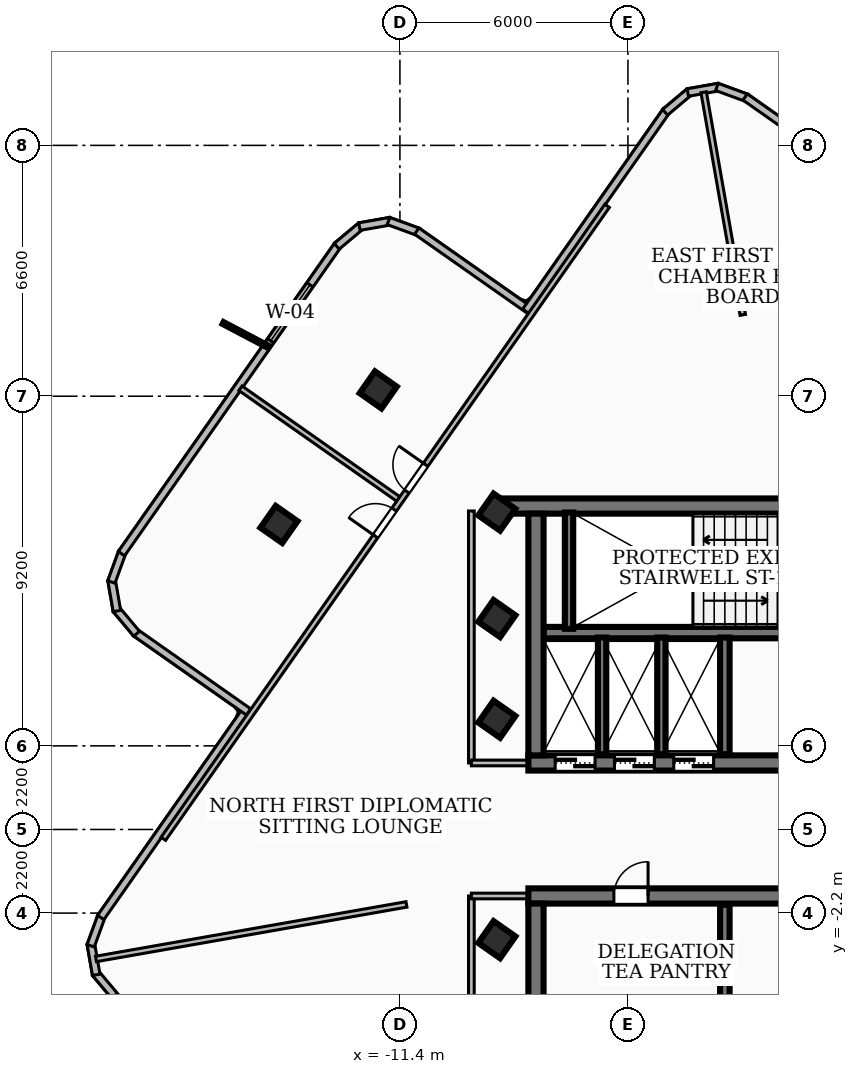
"""IFC4 building model, lengths in metres.
Left out: names, types, materials, properties, quantities, classifications, styles, units other than length and angle.
Written with IfcOpenShell. Run it as: python <this file> out.ifc"""

import sys

from ifc_helpers import new_model, si_unit, direction, frame, frame_2d, origin, origin_2d, place, context, subcontext, project, spatial, rectangle, extrude, element, fill, save


model = new_model("IFC4")
c1 = context("Model", 3, precision=1e-05, world=origin(), true_north=direction((0.0, 1.0)))
c2 = subcontext(c1, "Body", "Model", "MODEL_VIEW")
j1 = project(units=[si_unit("LENGTHUNIT", "METRE"), si_unit("PLANEANGLEUNIT", "RADIAN")], contexts=[c1])
p1 = place(None, origin())
s1 = spatial("IfcSite", under=j1, at=p1, CompositionType="ELEMENT")
p2 = place(p1, origin())
s2 = spatial("IfcBuilding", under=s1, at=p2, CompositionType="ELEMENT")
p3 = place(p2, frame((0.0, 0.0, 264.6)))
s3 = spatial("IfcBuildingStorey", under=s2, at=p3, CompositionType="ELEMENT", Elevation=264.6)
p4 = place(p3, frame((-8.78, 8.51, 0.0), z_axis=(0.0, 0.0, 1.0), x_axis=(1.0, 0.0, 0.0)))
e1 = element("IfcWall", 1, at=p4, inside=s3, PredefinedType="SHEAR", context=c2, shape_type="SweptSolid", body=[
    extrude(rectangle(XDim=17.56, YDim=0.4, at=frame_2d((8.78, 0.0))), origin(), (0.0, 0.0, 1.0), 3.16),
])
p5 = place(p3, frame((8.02, 1.75, 0.0), z_axis=(0.0, 0.0, 1.0), x_axis=(-1.0, 0.0, 0.0)))
e2 = element("IfcWall", 2, at=p5, inside=s3, PredefinedType="SHEAR", context=c2, shape_type="SweptSolid", body=[
    extrude(rectangle(XDim=16.04, YDim=0.4, at=frame_2d((8.02, 0.0))), origin(), (0.0, 0.0, 1.0), 3.16),
])
p6 = place(p5, frame((7.45, 0.0, 0.0)))
e3 = element("IfcOpeningElement", 3, at=p6, cuts=e2, PredefinedType="OPENING", context=c2, shape_type="SweptSolid", body=[
    extrude(rectangle(XDim=1.0, YDim=2.1, at=frame_2d((0.5, 1.05))), frame((0.0, 0.21, 0.0), z_axis=(0.0, -1.0, 0.0), x_axis=(1.0, 0.0, 0.0)), (0.0, 0.0, 1.0), 0.42),
])
p7 = place(p5, frame((14.285, 0.0, 0.0)))
e4 = element("IfcOpeningElement", 4, at=p7, cuts=e2, PredefinedType="OPENING", context=c2, shape_type="SweptSolid", body=[
    extrude(rectangle(XDim=1.05, YDim=2.15, at=frame_2d((0.525, 1.075))), frame((0.0, 0.21, 0.0), z_axis=(0.0, -1.0, 0.0), x_axis=(1.0, 0.0, 0.0)), (0.0, 0.0, 1.0), 0.42),
])
p8 = place(p5, frame((12.725, 0.0, 0.0)))
e5 = element("IfcOpeningElement", 5, at=p8, cuts=e2, PredefinedType="OPENING", context=c2, shape_type="SweptSolid", body=[
    extrude(rectangle(XDim=1.05, YDim=2.15, at=frame_2d((0.525, 1.075))), frame((0.0, 0.21, 0.0), z_axis=(0.0, -1.0, 0.0), x_axis=(1.0, 0.0, 0.0)), (0.0, 0.0, 1.0), 0.42),
])
p9 = place(p5, frame((11.165, 0.0, 0.0)))
e6 = element("IfcOpeningElement", 6, at=p9, cuts=e2, PredefinedType="OPENING", context=c2, shape_type="SweptSolid", body=[
    extrude(rectangle(XDim=1.05, YDim=2.15, at=frame_2d((0.525, 1.075))), frame((0.0, 0.21, 0.0), z_axis=(0.0, -1.0, 0.0), x_axis=(1.0, 0.0, 0.0)), (0.0, 0.0, 1.0), 0.42),
])
p10 = place(p5, frame((3.4, 0.0, 0.0)))
e7 = element("IfcOpeningElement", 7, at=p10, cuts=e2, PredefinedType="OPENING", context=c2, shape_type="SweptSolid", body=[
    extrude(rectangle(XDim=0.9, YDim=2.06, at=frame_2d((0.45, 1.03))), frame((0.0, 0.21, 0.0), z_axis=(0.0, -1.0, 0.0), x_axis=(1.0, 0.0, 0.0)), (0.0, 0.0, 1.0), 0.42),
])
p11 = place(p5, frame((1.1, 0.0, 0.0)))
e8 = element("IfcOpeningElement", 8, at=p11, cuts=e2, PredefinedType="OPENING", context=c2, shape_type="SweptSolid", body=[
    extrude(rectangle(XDim=0.9, YDim=2.06, at=frame_2d((0.45, 1.03))), frame((0.0, 0.21, 0.0), z_axis=(0.0, -1.0, 0.0), x_axis=(1.0, 0.0, 0.0)), (0.0, 0.0, 1.0), 0.42),
])
p12 = place(p3, frame((-7.82, 1.95, 0.0), z_axis=(0.0, 0.0, 1.0), x_axis=(0.0, 1.0, 0.0)))
e9 = element("IfcWall", 9, at=p12, inside=s3, PredefinedType="SHEAR", context=c2, shape_type="SweptSolid", body=[
    extrude(rectangle(XDim=6.36, YDim=0.4, at=frame_2d((3.18, 0.0))), origin(), (0.0, 0.0, 1.0), 3.16),
])
p13 = place(p3, frame((7.62, 5.18, 0.0), z_axis=(0.0, 0.0, 1.0), x_axis=(-1.0, 0.0, 0.0)))
e10 = element("IfcWall", 10, at=p13, inside=s3, PredefinedType="SOLIDWALL", context=c2, shape_type="SweptSolid", body=[
    extrude(rectangle(XDim=15.24, YDim=0.3, at=frame_2d((7.62, 0.0))), origin(), (0.0, 0.0, 1.0), 3.16),
])
p14 = place(p13, frame((5.77, 0.0, 0.0)))
e11 = element("IfcOpeningElement", 11, at=p14, cuts=e10, PredefinedType="OPENING", context=c2, shape_type="SweptSolid", body=[
    extrude(rectangle(XDim=1.1, YDim=2.15, at=frame_2d((0.55, 1.075))), frame((0.0, 0.16, 0.0), z_axis=(0.0, -1.0, 0.0), x_axis=(1.0, 0.0, 0.0)), (0.0, 0.0, 1.0), 0.32),
])
p15 = place(p13, frame((2.97, 0.0, 0.0)))
e12 = element("IfcOpeningElement", 12, at=p15, cuts=e10, PredefinedType="OPENING", context=c2, shape_type="SweptSolid", body=[
    extrude(rectangle(XDim=1.1, YDim=2.15, at=frame_2d((0.55, 1.075))), frame((0.0, 0.16, 0.0), z_axis=(0.0, -1.0, 0.0), x_axis=(1.0, 0.0, 0.0)), (0.0, 0.0, 1.0), 0.32),
])
p16 = place(p13, frame((7.97, 0.0, 0.0)))
e13 = element("IfcOpeningElement", 13, at=p16, cuts=e10, PredefinedType="OPENING", context=c2, shape_type="SweptSolid", body=[
    extrude(rectangle(XDim=1.0, YDim=2.1, at=frame_2d((0.5, 1.05))), frame((0.0, 0.16, 0.0), z_axis=(0.0, -1.0, 0.0), x_axis=(1.0, 0.0, 0.0)), (0.0, 0.0, 1.0), 0.32),
])
p17 = place(p3, frame((-8.02, -1.75, 0.0), z_axis=(0.0, 0.0, 1.0), x_axis=(1.0, 0.0, 0.0)))
e14 = element("IfcWall", 14, at=p17, inside=s3, PredefinedType="SHEAR", context=c2, shape_type="SweptSolid", body=[
    extrude(rectangle(XDim=16.04, YDim=0.4, at=frame_2d((8.02, 0.0))), origin(), (0.0, 0.0, 1.0), 3.16),
])
p18 = place(p17, frame((7.45, 0.0, 0.0)))
e15 = element("IfcOpeningElement", 15, at=p18, cuts=e14, PredefinedType="OPENING", context=c2, shape_type="SweptSolid", body=[
    extrude(rectangle(XDim=1.0, YDim=2.1, at=frame_2d((0.5, 1.05))), frame((0.0, 0.21, 0.0), z_axis=(0.0, -1.0, 0.0), x_axis=(1.0, 0.0, 0.0)), (0.0, 0.0, 1.0), 0.42),
])
p19 = place(p17, frame((12.65, 0.0, 0.0)))
e16 = element("IfcOpeningElement", 16, at=p19, cuts=e14, PredefinedType="OPENING", context=c2, shape_type="SweptSolid", body=[
    extrude(rectangle(XDim=0.9, YDim=2.06, at=frame_2d((0.45, 1.03))), frame((0.0, 0.21, 0.0), z_axis=(0.0, -1.0, 0.0), x_axis=(1.0, 0.0, 0.0)), (0.0, 0.0, 1.0), 0.42),
])
p20 = place(p17, frame((2.25, 0.0, 0.0)))
e17 = element("IfcOpeningElement", 17, at=p20, cuts=e14, PredefinedType="OPENING", context=c2, shape_type="SweptSolid", body=[
    extrude(rectangle(XDim=0.9, YDim=2.06, at=frame_2d((0.45, 1.03))), frame((0.0, 0.21, 0.0), z_axis=(0.0, -1.0, 0.0), x_axis=(1.0, 0.0, 0.0)), (0.0, 0.0, 1.0), 0.42),
])
p21 = place(p3, frame((-7.82, -8.31, 0.0), z_axis=(0.0, 0.0, 1.0), x_axis=(0.0, 1.0, 0.0)))
e18 = element("IfcWall", 18, at=p21, inside=s3, PredefinedType="SHEAR", context=c2, shape_type="SweptSolid", body=[
    extrude(rectangle(XDim=6.36, YDim=0.4, at=frame_2d((3.18, 0.0))), origin(), (0.0, 0.0, 1.0), 3.16),
])
p22 = place(p3, frame((-6.95, 5.28, 0.0), z_axis=(0.0, 0.0, 1.0), x_axis=(0.0, 1.0, 0.0)))
e19 = element("IfcWall", 19, at=p22, inside=s3, PredefinedType="SOLIDWALL", context=c2, shape_type="SweptSolid", body=[
    extrude(rectangle(XDim=3.06, YDim=0.22, at=frame_2d((1.53, 0.0))), origin(), (0.0, 0.0, 1.0), 3.16),
])
for number, where, z_axis, x_axis in (
    (20, (-2.85, 1.98, 0.0), (0.0, 0.0, 1.0), (0.0, 1.0, 0.0)),
    (21, (-2.85, -5.05, 0.0), (0.0, 0.0, 1.0), (0.0, 1.0, 0.0)),
):
    element("IfcWall", number, at=place(p3, frame(where, z_axis=z_axis, x_axis=x_axis)), inside=s3, PredefinedType="SOLIDWALL", context=c2, shape_type="SweptSolid", body=[
        extrude(rectangle(XDim=3.07, YDim=0.25, at=frame_2d((1.535, 0.0))), origin(), (0.0, 0.0, 1.0), 3.16),
    ])
for number, where, z_axis, x_axis in (
    (22, (-6.08, 1.98, 0.0), (0.0, 0.0, 1.0), (0.0, 1.0, 0.0)),
    (23, (-4.52, 1.98, 0.0), (0.0, 0.0, 1.0), (0.0, 1.0, 0.0)),
):
    element("IfcWall", number, at=place(p3, frame(where, z_axis=z_axis, x_axis=x_axis)), inside=s3, PredefinedType="SOLIDWALL", context=c2, shape_type="SweptSolid", body=[
        extrude(rectangle(XDim=3.07, YDim=0.22, at=frame_2d((1.535, 0.0))), origin(), (0.0, 0.0, 1.0), 3.16),
    ])
for number, where, z_axis, x_axis in (
    (24, (-8.85, -2.9, 0.0), (0.0, 0.0, 1.0), (0.574, 0.819, 0.0)),
    (25, (-8.85, 2.9, 0.0), (0.0, 0.0, 1.0), (0.574, 0.819, 0.0)),
    (26, (-8.85, 5.55, 0.0), (0.0, 0.0, 1.0), (0.574, 0.819, 0.0)),
    (27, (-8.85, 8.35, 0.0), (0.0, 0.0, 1.0), (0.574, 0.819, 0.0)),
    (28, (-11.971, 11.566, 0.0), (0.0, 0.0, 1.0), (0.574, 0.819, 0.0)),
    (29, (-14.583, 8.026, 0.0), (0.0, 0.0, 1.0), (0.574, 0.819, 0.0)),
):
    element("IfcColumn", number, at=place(p3, frame(where, z_axis=z_axis, x_axis=x_axis)), inside=s3, PredefinedType="COLUMN", context=c2, shape_type="SweptSolid", body=[
        extrude(rectangle(XDim=0.7, YDim=0.7, at=origin_2d()), origin(), (0.0, 0.0, 1.0), 3.42),
    ])
p23 = place(p3, frame((-18.872, -4.422, 0.0), z_axis=(0.0, 0.0, 1.0), x_axis=(-0.642816318642, 0.766020352528, 0.0)))
e30 = element("IfcWall", 30, at=p23, inside=s3, PredefinedType="SOLIDWALL", context=c2, shape_type="SweptSolid", body=[
    extrude(rectangle(XDim=0.838, YDim=0.2, at=frame_2d((0.419, 0.0))), origin(), (0.0, 0.0, 1.0), 3.16),
])
p24 = place(p3, frame((-19.391, -3.824, 0.0), z_axis=(0.0, 0.0, 1.0), x_axis=(-0.171877988141, 0.985118245285, 0.0)))
e31 = element("IfcWall", 31, at=p24, inside=s3, PredefinedType="SOLIDWALL", context=c2, shape_type="SweptSolid", body=[
    extrude(rectangle(XDim=0.825, YDim=0.2, at=frame_2d((0.413, 0.0))), origin(), (0.0, 0.0, 1.0), 3.16),
])
p25 = place(p3, frame((-19.538, -3.059, 0.0), z_axis=(0.0, 0.0, 1.0), x_axis=(0.344083284363, 0.938939131905, 0.0)))
e32 = element("IfcWall", 32, at=p25, inside=s3, PredefinedType="SOLIDWALL", context=c2, shape_type="SweptSolid", body=[
    extrude(rectangle(XDim=0.837, YDim=0.2, at=frame_2d((0.418, 0.0))), origin(), (0.0, 0.0, 1.0), 3.16),
])
p26 = place(p3, frame((-19.273, -2.316, 0.0), z_axis=(0.0, 0.0, 1.0), x_axis=(0.574227764949, 0.818695592978, 0.0)))
e33 = element("IfcWall", 33, at=p26, inside=s3, PredefinedType="SOLIDWALL", context=c2, shape_type="SweptSolid", body=[
    extrude(rectangle(XDim=6.741, YDim=0.2, at=frame_2d((3.371, 0.0))), origin(), (0.0, 0.0, 1.0), 3.16),
])
p27 = place(p3, frame((-15.383, 3.092, 0.0), z_axis=(0.0, 0.0, 1.0), x_axis=(-0.818664531158, 0.574272048269, 0.0)))
e34 = element("IfcWall", 34, at=p27, inside=s3, PredefinedType="SOLIDWALL", context=c2, shape_type="SweptSolid", body=[
    extrude(rectangle(XDim=3.641, YDim=0.2, at=frame_2d((1.821, 0.0))), origin(), (0.0, 0.0, 1.0), 3.16),
])
p28 = place(p3, frame((-18.328, 5.15, 0.0), z_axis=(0.0, 0.0, 1.0), x_axis=(-0.642303159159, 0.766450684477, 0.0)))
e35 = element("IfcWall", 35, at=p28, inside=s3, PredefinedType="SOLIDWALL", context=c2, shape_type="SweptSolid", body=[
    extrude(rectangle(XDim=0.838, YDim=0.2, at=frame_2d((0.419, 0.0))), origin(), (0.0, 0.0, 1.0), 3.16),
])
p29 = place(p3, frame((-18.846, 5.748, 0.0), z_axis=(0.0, 0.0, 1.0), x_axis=(-0.172165058078, 0.985068115806, 0.0)))
e36 = element("IfcWall", 36, at=p29, inside=s3, PredefinedType="SOLIDWALL", context=c2, shape_type="SweptSolid", body=[
    extrude(rectangle(XDim=0.825, YDim=0.2, at=frame_2d((0.413, 0.0))), origin(), (0.0, 0.0, 1.0), 3.16),
])
p30 = place(p3, frame((-18.993, 6.513, 0.0), z_axis=(0.0, 0.0, 1.0), x_axis=(0.343449935769, 0.93917098636, 0.0)))
e37 = element("IfcWall", 37, at=p30, inside=s3, PredefinedType="SOLIDWALL", context=c2, shape_type="SweptSolid", body=[
    extrude(rectangle(XDim=0.838, YDim=0.2, at=frame_2d((0.419, 0.0))), origin(), (0.0, 0.0, 1.0), 3.16),
])
p31 = place(p3, frame((-18.728, 7.257, 0.0), z_axis=(0.0, 0.0, 1.0), x_axis=(0.574152395536, 0.818748451419, 0.0)))
e38 = element("IfcWall", 38, at=p31, inside=s3, PredefinedType="SOLIDWALL", context=c2, shape_type="SweptSolid", body=[
    extrude(rectangle(XDim=9.923, YDim=0.2, at=frame_2d((4.961, 0.0))), origin(), (0.0, 0.0, 1.0), 3.16),
])
p32 = place(p31, frame((6.84, 0.0, 0.85)))
e39 = element("IfcOpeningElement", 39, at=p32, cuts=e38, PredefinedType="OPENING", context=c2, shape_type="SweptSolid", body=[
    extrude(rectangle(XDim=1.8, YDim=2.0, at=frame_2d((0.9, 1.0))), frame((0.0, 0.11, 0.0), z_axis=(0.0, -1.0, 0.0), x_axis=(1.0, 0.0, 0.0)), (0.0, 0.0, 1.0), 0.22),
])
p33 = place(p3, frame((-13.064, 15.345, 0.0), z_axis=(0.0, 0.0, 1.0), x_axis=(0.766330415365, 0.642446647191, 0.0)))
e40 = element("IfcWall", 40, at=p33, inside=s3, PredefinedType="SOLIDWALL", context=c2, shape_type="SweptSolid", body=[
    extrude(rectangle(XDim=0.838, YDim=0.2, at=frame_2d((0.419, 0.0))), origin(), (0.0, 0.0, 1.0), 3.16),
])
p34 = place(p3, frame((-12.466, 15.863, 0.0), z_axis=(0.0, 0.0, 1.0), x_axis=(0.985118245285, 0.171877988141, 0.0)))
e41 = element("IfcWall", 41, at=p34, inside=s3, PredefinedType="SOLIDWALL", context=c2, shape_type="SweptSolid", body=[
    extrude(rectangle(XDim=0.825, YDim=0.2, at=frame_2d((0.413, 0.0))), origin(), (0.0, 0.0, 1.0), 3.16),
])
p35 = place(p3, frame((-11.701, 16.01, 0.0), z_axis=(0.0, 0.0, 1.0), x_axis=(0.939042573482, -0.343800880145, 0.0)))
e42 = element("IfcWall", 42, at=p35, inside=s3, PredefinedType="SOLIDWALL", context=c2, shape_type="SweptSolid", body=[
    extrude(rectangle(XDim=0.838, YDim=0.2, at=frame_2d((0.419, 0.0))), origin(), (0.0, 0.0, 1.0), 3.16),
])
p36 = place(p3, frame((-10.957, 15.745, 0.0), z_axis=(0.0, 0.0, 1.0), x_axis=(0.818576054501, -0.574398157202, 0.0)))
e43 = element("IfcWall", 43, at=p36, inside=s3, PredefinedType="SOLIDWALL", context=c2, shape_type="SweptSolid", body=[
    extrude(rectangle(XDim=3.64, YDim=0.2, at=frame_2d((1.82, 0.0))), origin(), (0.0, 0.0, 1.0), 3.16),
])
p37 = place(p3, frame((-8.088, 13.635, 0.0), z_axis=(0.0, 0.0, 1.0), x_axis=(0.574286279317, 0.818654548261, 0.0)))
e44 = element("IfcWall", 44, at=p37, inside=s3, PredefinedType="SOLIDWALL", context=c2, shape_type="SweptSolid", body=[
    extrude(rectangle(XDim=6.441, YDim=0.2, at=frame_2d((3.22, 0.0))), origin(), (0.0, 0.0, 1.0), 3.16),
])
p38 = place(p3, frame((-4.422, 18.872, 0.0), z_axis=(0.0, 0.0, 1.0), x_axis=(0.766020352528, 0.642816318642, 0.0)))
e45 = element("IfcWall", 45, at=p38, inside=s3, PredefinedType="SOLIDWALL", context=c2, shape_type="SweptSolid", body=[
    extrude(rectangle(XDim=0.838, YDim=0.2, at=frame_2d((0.419, 0.0))), origin(), (0.0, 0.0, 1.0), 3.16),
])
p39 = place(p3, frame((-3.824, 19.391, 0.0), z_axis=(0.0, 0.0, 1.0), x_axis=(0.985118245285, 0.171877988141, 0.0)))
e46 = element("IfcWall", 46, at=p39, inside=s3, PredefinedType="SOLIDWALL", context=c2, shape_type="SweptSolid", body=[
    extrude(rectangle(XDim=0.825, YDim=0.2, at=frame_2d((0.413, 0.0))), origin(), (0.0, 0.0, 1.0), 3.16),
])
p40 = place(p3, frame((-3.059, 19.538, 0.0), z_axis=(0.0, 0.0, 1.0), x_axis=(0.938939131905, -0.344083284363, 0.0)))
e47 = element("IfcWall", 47, at=p40, inside=s3, PredefinedType="SOLIDWALL", context=c2, shape_type="SweptSolid", body=[
    extrude(rectangle(XDim=0.837, YDim=0.2, at=frame_2d((0.418, 0.0))), origin(), (0.0, 0.0, 1.0), 3.16),
])
p41 = place(p3, frame((-2.316, 19.273, 0.0), z_axis=(0.0, 0.0, 1.0), x_axis=(0.818695592978, -0.574227764949, 0.0)))
e48 = element("IfcWall", 48, at=p41, inside=s3, PredefinedType="SOLIDWALL", context=c2, shape_type="SweptSolid", body=[
    extrude(rectangle(XDim=6.741, YDim=0.2, at=frame_2d((3.371, 0.0))), origin(), (0.0, 0.0, 1.0), 3.16),
])
p42 = place(p3, frame((-9.52, 1.75, 0.0), z_axis=(0.0, 0.0, 1.0), x_axis=(0.0, 1.0, 0.0)))
e49 = element("IfcWall", 49, at=p42, inside=s3, PredefinedType="PARTITIONING", context=c2, shape_type="SweptSolid", body=[
    extrude(rectangle(XDim=6.63, YDim=0.15, at=frame_2d((3.315, 0.0))), origin(), (0.0, 0.0, 1.0), 2.53),
])
p43 = place(p3, frame((-7.85, 1.75, 0.0), z_axis=(0.0, 0.0, 1.0), x_axis=(-1.0, 0.0, 0.0)))
e50 = element("IfcWall", 50, at=p43, inside=s3, PredefinedType="PARTITIONING", context=c2, shape_type="SweptSolid", body=[
    extrude(rectangle(XDim=1.67, YDim=0.15, at=frame_2d((0.835, 0.0))), origin(), (0.0, 0.0, 1.0), 2.39),
])
p44 = place(p3, frame((-9.52, -8.38, 0.0), z_axis=(0.0, 0.0, 1.0), x_axis=(0.0, 1.0, 0.0)))
e51 = element("IfcWall", 51, at=p44, inside=s3, PredefinedType="PARTITIONING", context=c2, shape_type="SweptSolid", body=[
    extrude(rectangle(XDim=6.63, YDim=0.15, at=frame_2d((3.315, 0.0))), origin(), (0.0, 0.0, 1.0), 3.16),
])
p45 = place(p3, frame((-7.85, -1.75, 0.0), z_axis=(0.0, 0.0, 1.0), x_axis=(-1.0, 0.0, 0.0)))
e52 = element("IfcWall", 52, at=p45, inside=s3, PredefinedType="PARTITIONING", context=c2, shape_type="SweptSolid", body=[
    extrude(rectangle(XDim=1.67, YDim=0.15, at=frame_2d((0.835, 0.0))), origin(), (0.0, 0.0, 1.0), 2.39),
])
p46 = place(p3, frame((-2.378, 13.54, 0.0), z_axis=(0.0, 0.0, 1.0), x_axis=(-0.173019547247, 0.984918390665, 0.0)))
e53 = element("IfcWall", 53, at=p46, inside=s3, PredefinedType="PARTITIONING", context=c2, shape_type="SweptSolid", body=[
    extrude(rectangle(XDim=5.948, YDim=0.145, at=frame_2d((2.974, 0.0))), origin(), (0.0, 0.0, 1.0), 3.16),
])
p47 = place(p3, frame((-11.228, -1.972, 0.0), z_axis=(0.0, 0.0, 1.0), x_axis=(-0.984921322849, -0.17300285488, 0.0)))
e54 = element("IfcWall", 54, at=p47, inside=s3, PredefinedType="PARTITIONING", context=c2, shape_type="SweptSolid", body=[
    extrude(rectangle(XDim=8.295, YDim=0.145, at=frame_2d((4.147, 0.0))), origin(), (0.0, 0.0, 1.0), 3.16),
])
p48 = place(p3, frame((-11.433, 8.689, 0.0), z_axis=(0.0, 0.0, 1.0), x_axis=(-0.81868341552, 0.574245126363, 0.0)))
e55 = element("IfcWall", 55, at=p48, inside=s3, PredefinedType="PARTITIONING", context=c2, shape_type="SweptSolid", body=[
    extrude(rectangle(XDim=5.085, YDim=0.145, at=frame_2d((2.542, 0.0))), origin(), (0.0, 0.0, 1.0), 3.16),
])
p49 = place(p3, frame((-17.625, -0.245, 0.0), z_axis=(0.0, 0.0, 1.0), x_axis=(0.574126736534, 0.818766444352, 0.0)))
e56 = element("IfcWall", 56, at=p49, inside=s3, PredefinedType="PARTITIONING", context=c2, shape_type="SweptSolid", body=[
    extrude(rectangle(XDim=20.34, YDim=0.145, at=frame_2d((10.17, 0.0))), origin(), (0.0, 0.0, 1.0), 2.53),
])
p50 = place(p49, frame((11.16, 0.0, 0.0)))
e57 = element("IfcOpeningElement", 57, at=p50, cuts=e56, PredefinedType="OPENING", context=c2, shape_type="SweptSolid", body=[
    extrude(rectangle(XDim=0.86, YDim=2.04, at=frame_2d((0.43, 1.02))), frame((0.0, 0.083, 0.0), z_axis=(0.0, -1.0, 0.0), x_axis=(1.0, 0.0, 0.0)), (0.0, 0.0, 1.0), 0.165),
])
p51 = place(p49, frame((9.72, 0.0, 0.0)))
e58 = element("IfcOpeningElement", 58, at=p51, cuts=e56, PredefinedType="OPENING", context=c2, shape_type="SweptSolid", body=[
    extrude(rectangle(XDim=0.86, YDim=2.04, at=frame_2d((0.43, 1.02))), frame((0.0, 0.083, 0.0), z_axis=(0.0, -1.0, 0.0), x_axis=(1.0, 0.0, 0.0)), (0.0, 0.0, 1.0), 0.165),
])
p52 = place(p32, origin())
e59 = element("IfcWindow", 59, at=p52, inside=s3, PartitioningType="SINGLE_PANEL", PredefinedType="WINDOW", context=c2, shape_type="SweptSolid", body=[
    extrude(rectangle(XDim=1.8, YDim=2.0, at=frame_2d((0.9, 1.0))), frame((0.0, 0.03, 0.0), z_axis=(0.0, -1.0, 0.0), x_axis=(1.0, 0.0, 0.0)), (0.0, 0.0, 1.0), 0.06),
])
fill(e39, e59)
p53 = place(p7, origin())
e60 = element("IfcDoor", 60, at=p53, inside=s3, OperationType="DOUBLE_DOOR_SLIDING", PredefinedType="DOOR", context=c2, shape_type="SweptSolid", body=[
    extrude(rectangle(XDim=1.05, YDim=2.15, at=frame_2d((0.525, 1.075))), frame((0.0, 0.025, 0.0), z_axis=(0.0, -1.0, 0.0), x_axis=(1.0, 0.0, 0.0)), (0.0, 0.0, 1.0), 0.05),
])
fill(e4, e60)
p54 = place(p8, origin())
e61 = element("IfcDoor", 61, at=p54, inside=s3, OperationType="DOUBLE_DOOR_SLIDING", PredefinedType="DOOR", context=c2, shape_type="SweptSolid", body=[
    extrude(rectangle(XDim=1.05, YDim=2.15, at=frame_2d((0.525, 1.075))), frame((0.0, 0.025, 0.0), z_axis=(0.0, -1.0, 0.0), x_axis=(1.0, 0.0, 0.0)), (0.0, 0.0, 1.0), 0.05),
])
fill(e5, e61)
p55 = place(p9, origin())
e62 = element("IfcDoor", 62, at=p55, inside=s3, OperationType="DOUBLE_DOOR_SLIDING", PredefinedType="DOOR", context=c2, shape_type="SweptSolid", body=[
    extrude(rectangle(XDim=1.05, YDim=2.15, at=frame_2d((0.525, 1.075))), frame((0.0, 0.025, 0.0), z_axis=(0.0, -1.0, 0.0), x_axis=(1.0, 0.0, 0.0)), (0.0, 0.0, 1.0), 0.05),
])
fill(e6, e62)
p56 = place(p20, origin())
e63 = element("IfcDoor", 63, at=p56, inside=s3, OperationType="SINGLE_SWING_RIGHT", PredefinedType="DOOR", context=c2, shape_type="SweptSolid", body=[
    extrude(rectangle(XDim=0.9, YDim=2.06, at=frame_2d((0.45, 1.03))), frame((0.0, 0.025, 0.0), z_axis=(0.0, -1.0, 0.0), x_axis=(1.0, 0.0, 0.0)), (0.0, 0.0, 1.0), 0.05),
])
fill(e17, e63)
p57 = place(p50, origin())
e64 = element("IfcDoor", 64, at=p57, inside=s3, OperationType="SINGLE_SWING_RIGHT", PredefinedType="DOOR", context=c2, shape_type="SweptSolid", body=[
    extrude(rectangle(XDim=0.86, YDim=2.04, at=frame_2d((0.43, 1.02))), frame((0.0, 0.025, 0.0), z_axis=(0.0, -1.0, 0.0), x_axis=(1.0, 0.0, 0.0)), (0.0, 0.0, 1.0), 0.05),
])
fill(e57, e64)
p58 = place(p51, origin())
e65 = element("IfcDoor", 65, at=p58, inside=s3, OperationType="SINGLE_SWING_LEFT", PredefinedType="DOOR", context=c2, shape_type="SweptSolid", body=[
    extrude(rectangle(XDim=0.86, YDim=2.04, at=frame_2d((0.43, 1.02))), frame((0.0, 0.025, 0.0), z_axis=(0.0, -1.0, 0.0), x_axis=(1.0, 0.0, 0.0)), (0.0, 0.0, 1.0), 0.05),
])
fill(e58, e65)
save(model, sys.argv[1])
